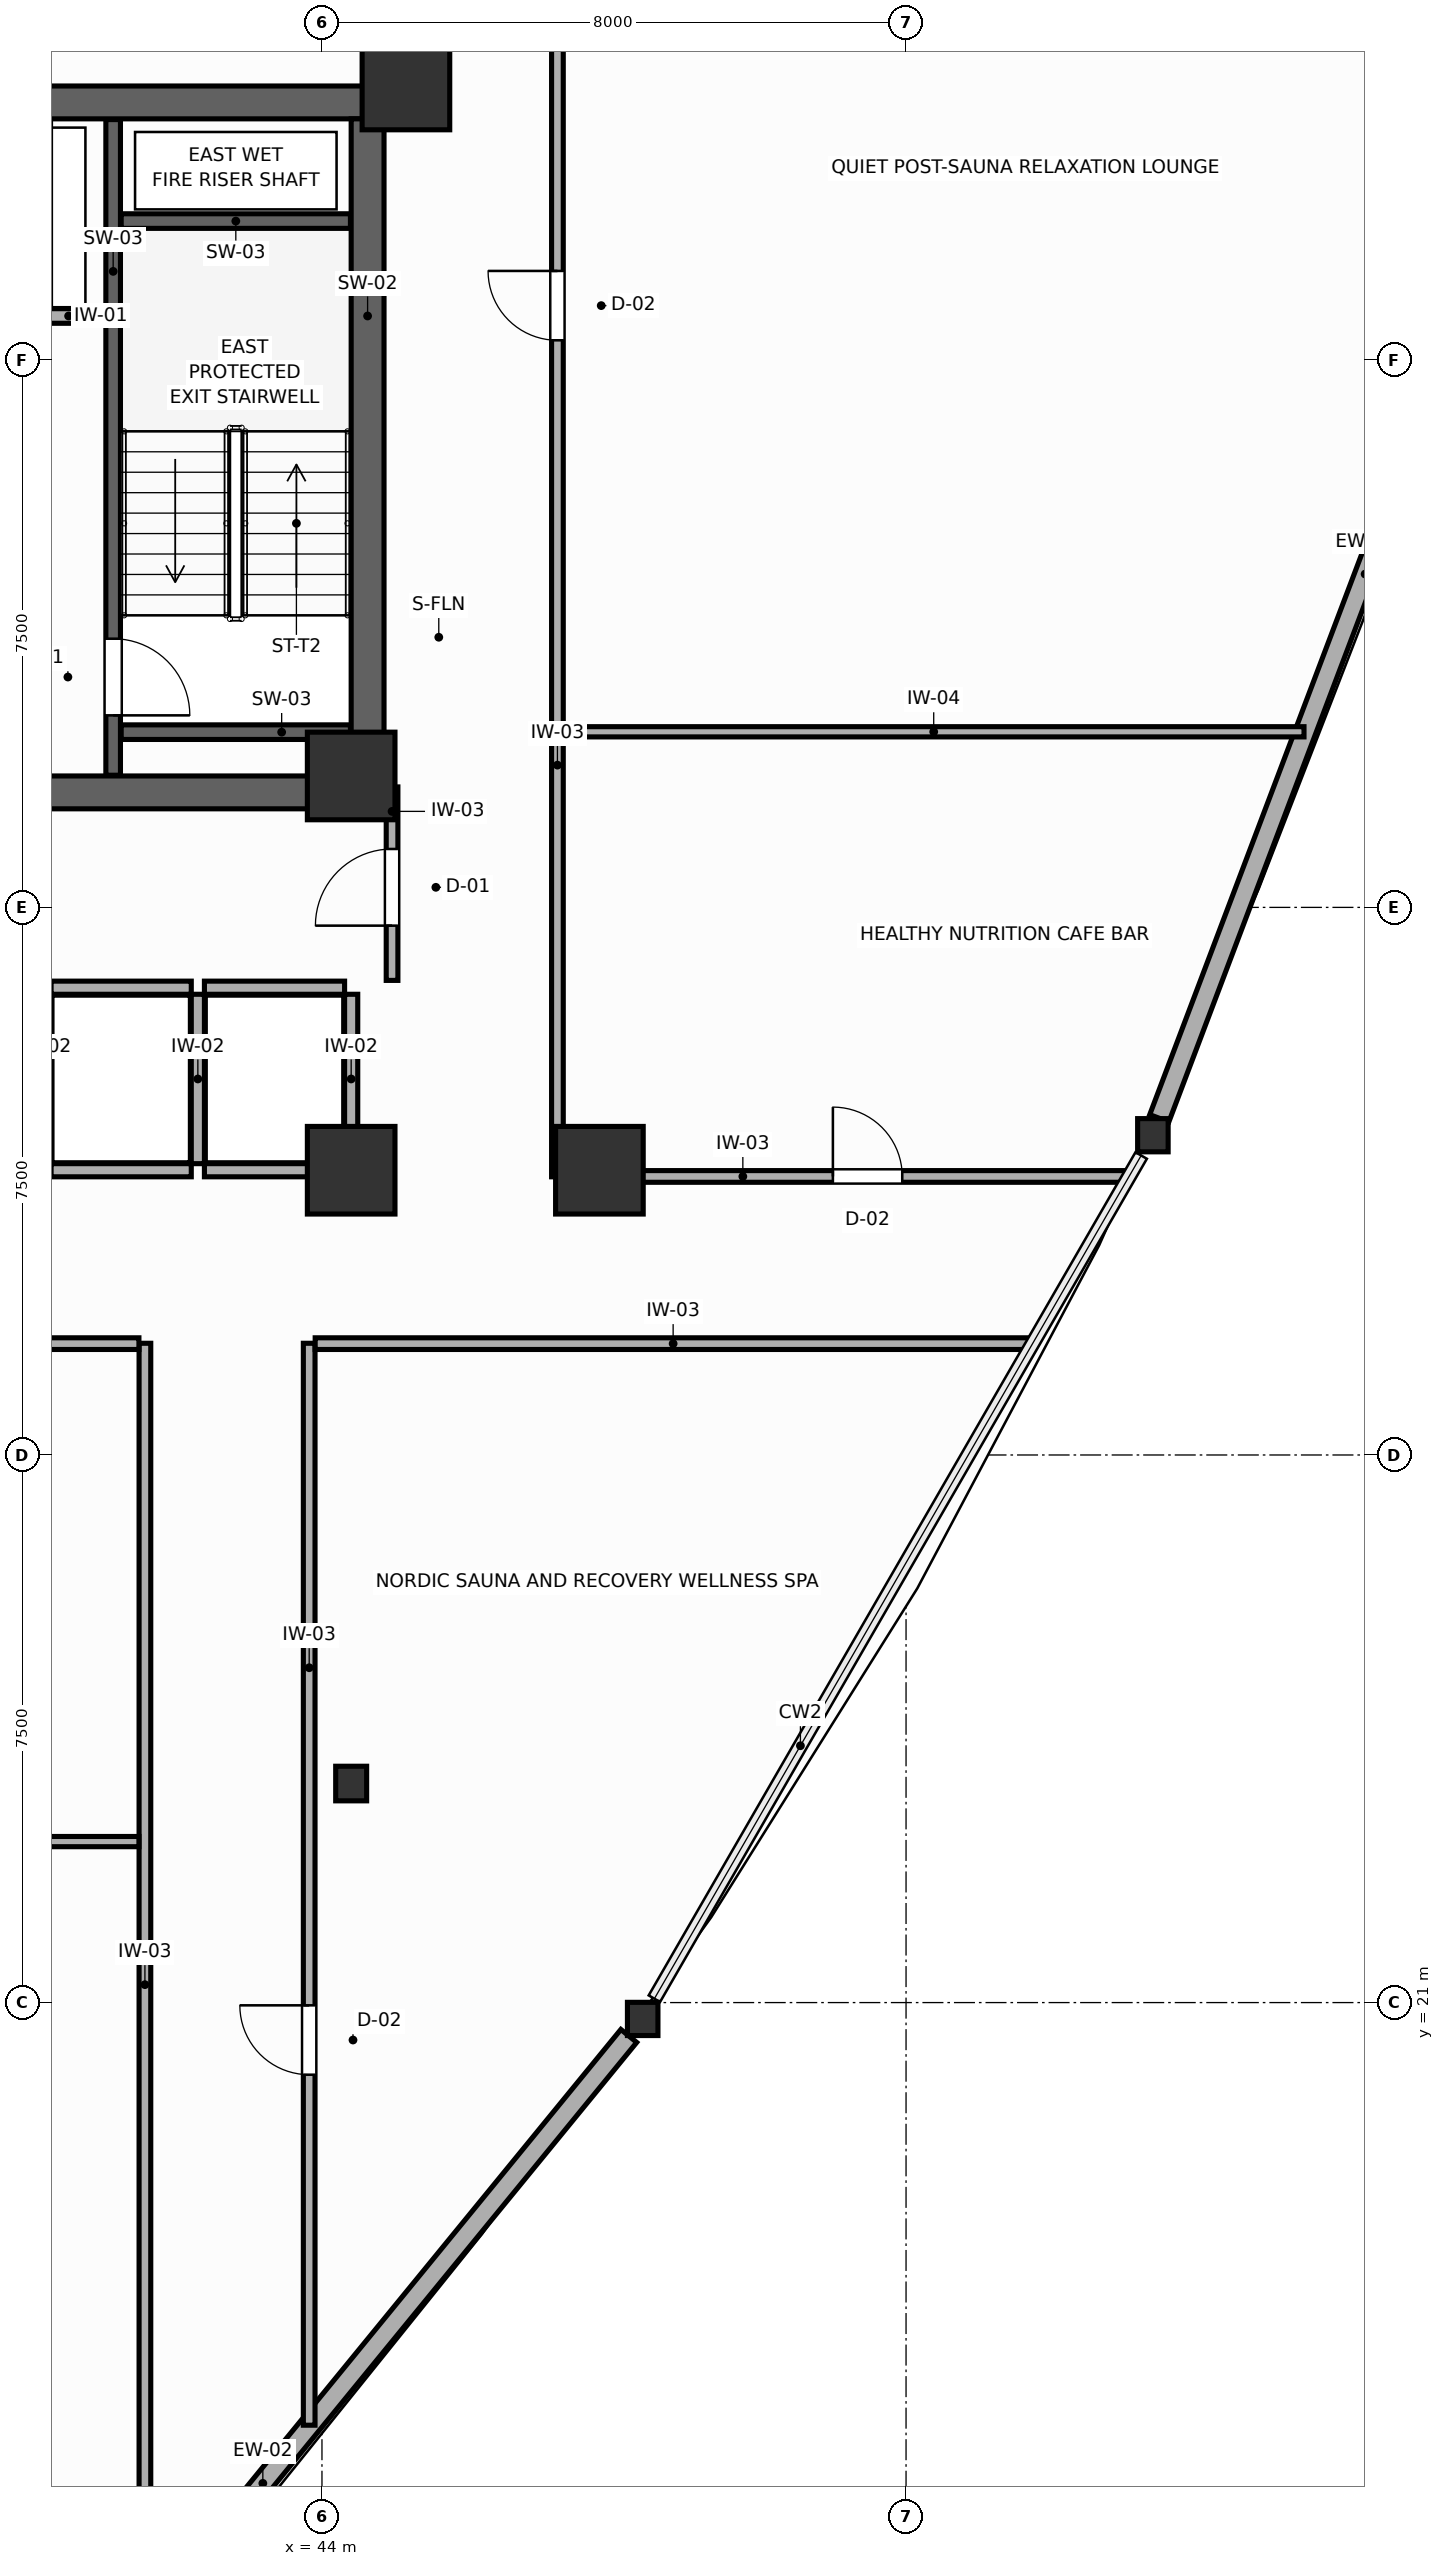
"""IFC4 building model, lengths in metres.
Left out: names, types, materials, properties, quantities, classifications, styles, units other than length and angle.
Written with IfcOpenShell. Run it as: python <this file> out.ifc"""

import sys

from ifc_helpers import new_model, si_unit, direction, frame, frame_2d, origin, origin_2d, place, context, subcontext, project, spatial, rectangle, i_section, extrude, source, transform, mapped, element, fill, save


model = new_model("IFC4")
c1 = context("Model", 3, precision=1e-05, world=origin(), true_north=direction((0.0, 1.0)))
c2 = subcontext(c1, "Body", "Model", "MODEL_VIEW")
j1 = project(units=[si_unit("LENGTHUNIT", "METRE"), si_unit("PLANEANGLEUNIT", "RADIAN")], contexts=[c1])
p1 = place(None, origin())
s1 = spatial("IfcSite", under=j1, at=p1, CompositionType="ELEMENT")
p2 = place(p1, origin())
s2 = spatial("IfcBuilding", under=s1, at=p2, CompositionType="ELEMENT")
p3 = place(p2, frame((0.0, 0.0, 109.8)))
s3 = spatial("IfcBuildingStorey", under=s2, at=p3, CompositionType="ELEMENT", Elevation=109.8)
p4 = place(p3, frame((27.15, 47.025, 0.0), z_axis=(0.0, 0.0, 1.0), x_axis=(1.0, 0.0, 0.0)))
e1 = element("IfcWall", 1, at=p4, inside=s3, PredefinedType="SHEAR", context=c2, shape_type="SweptSolid", body=[
    extrude(rectangle(XDim=17.7, YDim=0.45, at=frame_2d((8.85, 0.0))), origin(), (0.0, 0.0, 1.0), 3.6),
])
p5 = place(p3, frame((27.15, 37.575, 0.0), z_axis=(0.0, 0.0, 1.0), x_axis=(1.0, 0.0, 0.0)))
e2 = element("IfcWall", 2, at=p5, inside=s3, PredefinedType="SHEAR", context=c2, shape_type="SweptSolid", body=[
    extrude(rectangle(XDim=17.7, YDim=0.45, at=frame_2d((8.85, 0.0))), origin(), (0.0, 0.0, 1.0), 3.6),
])
p6 = place(p5, frame((4.875, 0.0, 0.0)))
e3 = element("IfcOpeningElement", 3, at=p6, cuts=e2, PredefinedType="OPENING", context=c2, shape_type="SweptSolid", body=[
    extrude(rectangle(XDim=1.05, YDim=2.1, at=frame_2d((0.525, 1.05))), frame((0.0, 0.235, 0.0), z_axis=(0.0, -1.0, 0.0), x_axis=(1.0, 0.0, 0.0)), (0.0, 0.0, 1.0), 0.47),
])
p7 = place(p5, frame((11.775, 0.0, 0.0)))
e4 = element("IfcOpeningElement", 4, at=p7, cuts=e2, PredefinedType="OPENING", context=c2, shape_type="SweptSolid", body=[
    extrude(rectangle(XDim=1.05, YDim=2.1, at=frame_2d((0.525, 1.05))), frame((0.0, 0.235, 0.0), z_axis=(0.0, -1.0, 0.0), x_axis=(1.0, 0.0, 0.0)), (0.0, 0.0, 1.0), 0.47),
])
p8 = place(p3, frame((44.625, 37.8, 0.0), z_axis=(0.0, 0.0, 1.0), x_axis=(0.0, 1.0, 0.0)))
e5 = element("IfcWall", 5, at=p8, inside=s3, PredefinedType="SHEAR", context=c2, shape_type="SweptSolid", body=[
    extrude(rectangle(XDim=9.0, YDim=0.45, at=frame_2d((4.5, 0.0))), origin(), (0.0, 0.0, 1.0), 3.6),
])
m1 = source(origin(), c2, "Body", "SweptSolid", [
    extrude(rectangle(XDim=1.2, YDim=1.2, at=origin_2d()), origin(), (0.0, 0.0, 1.0), 3.6),
])
for number, where, z_axis, x_axis in (
    (6, (45.15, 47.25, 0.0), (0.0, 0.0, 1.0), (1.0, 0.0, 0.0)),
    (7, (44.4, 37.8, 0.0), (0.0, 0.0, 1.0), (1.0, 0.0, 0.0)),
    (8, (44.4, 32.4, 0.0), (0.0, 0.0, 1.0), (1.0, 0.0, 0.0)),
    (9, (47.8, 32.4, 0.0), (0.0, 0.0, 1.0), (1.0, 0.0, 0.0)),
):
    element("IfcColumn", number, at=place(p3, frame(where, z_axis=z_axis, x_axis=x_axis)), inside=s3, PredefinedType="COLUMN", context=c2, shape_type="MappedRepresentation", body=[
        mapped(m1, transform((0.0, 0.0, 0.0), scale=1.0)),
    ])
m2 = source(origin(), c2, "Body", "SweptSolid", [
    extrude(i_section(OverallWidth=0.424, OverallDepth=0.474, WebThickness=0.045, FlangeThickness=0.072, FilletRadius=0.015, at=origin_2d()), origin(), (0.0, 0.0, 1.0), 3.6),
])
p9 = place(p3, frame((44.4, 24.0, 0.0), z_axis=(0.0, 0.0, 1.0), x_axis=(1.0, 0.0, 0.0)))
e10 = element("IfcColumn", 10, at=p9, inside=s3, PredefinedType="COLUMN", context=c2, shape_type="MappedRepresentation", body=[
    mapped(m2, transform((0.0, 0.0, 0.0), scale=1.0)),
])
m3 = source(origin(), c2, "Body", "SweptSolid", [
    extrude(i_section(OverallWidth=0.418, OverallDepth=0.455, WebThickness=0.039, FlangeThickness=0.063, FilletRadius=0.015, at=origin_2d()), origin(), (0.0, 0.0, 1.0), 3.6),
])
for number, where, z_axis, x_axis in (
    (11, (48.393, 20.776, 0.0), (0.0, 0.0, 1.0), (1.0, 0.0, 0.0)),
    (12, (55.381, 32.879, 0.0), (0.0, 0.0, 1.0), (1.0, 0.0, 0.0)),
):
    element("IfcColumn", number, at=place(p3, frame(where, z_axis=z_axis, x_axis=x_axis)), inside=s3, PredefinedType="COLUMN", context=c2, shape_type="MappedRepresentation", body=[
        mapped(m3, transform((0.0, 0.0, 0.0), scale=1.0)),
    ])
p10 = place(p3, frame((38.177, 8.287, 0.0), z_axis=(0.0, 0.0, 1.0), x_axis=(0.633140387555, 0.774036982092, 0.0)))
e13 = element("IfcWall", 13, at=p10, inside=s3, PredefinedType="SOLIDWALL", context=c2, shape_type="SweptSolid", body=[
    extrude(rectangle(XDim=15.834, YDim=0.28, at=frame_2d((7.917, 0.0))), origin(), (0.0, 0.0, 1.0), 1.87),
])
p11 = place(p3, frame((55.469, 33.112, 0.0), z_axis=(0.0, 0.0, 1.0), x_axis=(0.353771130195, 0.935332019895, 0.0)))
e14 = element("IfcWall", 14, at=p11, inside=s3, PredefinedType="SOLIDWALL", context=c2, shape_type="SweptSolid", body=[
    extrude(rectangle(XDim=15.937, YDim=0.28, at=frame_2d((7.969, 0.0))), origin(), (0.0, 0.0, 1.0), 1.87),
])
p12 = place(p3, frame((41.14, 37.81, 0.0), z_axis=(0.0, 0.0, 1.0), x_axis=(0.0, 1.0, 0.0)))
e15 = element("IfcWall", 15, at=p12, inside=s3, PredefinedType="SHEAR", context=c2, shape_type="SweptSolid", body=[
    extrude(rectangle(XDim=8.98, YDim=0.2, at=frame_2d((4.49, 0.0))), origin(), (0.0, 0.0, 1.0), 3.6),
])
p13 = place(p12, frame((0.82, 0.0, 0.0)))
e16 = element("IfcOpeningElement", 16, at=p13, cuts=e15, PredefinedType="OPENING", context=c2, shape_type="SweptSolid", body=[
    extrude(rectangle(XDim=1.05, YDim=2.1, at=frame_2d((0.525, 1.05))), frame((0.0, 0.11, 0.0), z_axis=(0.0, -1.0, 0.0), x_axis=(1.0, 0.0, 0.0)), (0.0, 0.0, 1.0), 0.22),
])
for number, where, z_axis, x_axis in (
    (17, (41.25, 45.4, 0.0), (0.0, 0.0, 1.0), (1.0, 0.0, 0.0)),
    (18, (41.25, 38.4, 0.0), (0.0, 0.0, 1.0), (1.0, 0.0, 0.0)),
):
    element("IfcWall", number, at=place(p3, frame(where, z_axis=z_axis, x_axis=x_axis)), inside=s3, PredefinedType="SHEAR", context=c2, shape_type="SweptSolid", body=[
        extrude(rectangle(XDim=3.14, YDim=0.2, at=frame_2d((1.57, 0.0))), origin(), (0.0, 0.0, 1.0), 3.6),
    ])
p14 = place(p3, frame((37.65, 44.1, 0.0), z_axis=(0.0, 0.0, 1.0), x_axis=(1.0, 0.0, 0.0)))
e19 = element("IfcWall", 19, at=p14, inside=s3, PredefinedType="PARTITIONING", context=c2, shape_type="SweptSolid", body=[
    extrude(rectangle(XDim=3.38, YDim=0.2, at=frame_2d((1.69, 0.0))), origin(), (0.0, 0.0, 1.0), 3.4),
])
p15 = place(p14, frame((1.0, 0.0, 0.0)))
e20 = element("IfcOpeningElement", 20, at=p15, cuts=e19, PredefinedType="OPENING", context=c2, shape_type="SweptSolid", body=[
    extrude(rectangle(XDim=1.2, YDim=2.1, at=frame_2d((0.6, 1.05))), frame((0.0, 0.11, 0.0), z_axis=(0.0, -1.0, 0.0), x_axis=(1.0, 0.0, 0.0)), (0.0, 0.0, 1.0), 0.22),
])
p16 = place(p3, frame((40.29, 34.9, 0.0), z_axis=(0.0, 0.0, 1.0), x_axis=(1.0, 0.0, 0.0)))
e21 = element("IfcWall", 21, at=p16, inside=s3, PredefinedType="PARTITIONING", context=c2, shape_type="SweptSolid", body=[
    extrude(rectangle(XDim=1.92, YDim=0.18, at=frame_2d((0.96, 0.0))), origin(), (0.0, 0.0, 1.0), 3.4),
])
p17 = place(p3, frame((40.29, 32.4, 0.0), z_axis=(0.0, 0.0, 1.0), x_axis=(1.0, 0.0, 0.0)))
e22 = element("IfcWall", 22, at=p17, inside=s3, PredefinedType="PARTITIONING", context=c2, shape_type="SweptSolid", body=[
    extrude(rectangle(XDim=1.92, YDim=0.18, at=frame_2d((0.96, 0.0))), origin(), (0.0, 0.0, 1.0), 2.16),
])
p18 = place(p3, frame((42.39, 34.9, 0.0), z_axis=(0.0, 0.0, 1.0), x_axis=(1.0, 0.0, 0.0)))
e23 = element("IfcWall", 23, at=p18, inside=s3, PredefinedType="PARTITIONING", context=c2, shape_type="SweptSolid", body=[
    extrude(rectangle(XDim=1.92, YDim=0.18, at=frame_2d((0.96, 0.0))), origin(), (0.0, 0.0, 1.0), 3.4),
])
p19 = place(p3, frame((42.39, 32.4, 0.0), z_axis=(0.0, 0.0, 1.0), x_axis=(1.0, 0.0, 0.0)))
e24 = element("IfcWall", 24, at=p19, inside=s3, PredefinedType="PARTITIONING", context=c2, shape_type="SweptSolid", body=[
    extrude(rectangle(XDim=1.92, YDim=0.18, at=frame_2d((0.96, 0.0))), origin(), (0.0, 0.0, 1.0), 2.16),
])
for number, where, z_axis, x_axis in (
    (25, (42.3, 32.49, 0.0), (0.0, 0.0, 1.0), (0.0, 1.0, 0.0)),
    (26, (44.4, 32.49, 0.0), (0.0, 0.0, 1.0), (0.0, 1.0, 0.0)),
):
    element("IfcWall", number, at=place(p3, frame(where, z_axis=z_axis, x_axis=x_axis)), inside=s3, PredefinedType="PARTITIONING", context=c2, shape_type="SweptSolid", body=[
        extrude(rectangle(XDim=2.32, YDim=0.18, at=frame_2d((1.16, 0.0))), origin(), (0.0, 0.0, 1.0), 3.4),
    ])
p20 = place(p3, frame((44.96, 35.0, 0.0), z_axis=(0.0, 0.0, 1.0), x_axis=(0.0, 1.0, 0.0)))
e27 = element("IfcWall", 27, at=p20, inside=s3, PredefinedType="PARTITIONING", context=c2, shape_type="SweptSolid", body=[
    extrude(rectangle(XDim=2.65, YDim=0.16, at=frame_2d((1.325, 0.0))), origin(), (0.0, 0.0, 1.0), 3.4),
])
p21 = place(p20, frame((0.75, 0.0, 0.0)))
e28 = element("IfcOpeningElement", 28, at=p21, cuts=e27, PredefinedType="OPENING", context=c2, shape_type="SweptSolid", body=[
    extrude(rectangle(XDim=1.05, YDim=2.1, at=frame_2d((0.525, 1.05))), frame((0.0, 0.09, 0.0), z_axis=(0.0, -1.0, 0.0), x_axis=(1.0, 0.0, 0.0)), (0.0, 0.0, 1.0), 0.18),
])
p22 = place(p3, frame((47.225, 32.31, 0.0), z_axis=(0.0, 0.0, 1.0), x_axis=(0.0, 1.0, 0.0)))
e29 = element("IfcWall", 29, at=p22, inside=s3, PredefinedType="PARTITIONING", context=c2, shape_type="SweptSolid", body=[
    extrude(rectangle(XDim=21.322, YDim=0.16, at=frame_2d((10.661, 0.0))), origin(), (0.0, 0.0, 1.0), 3.4),
])
p23 = place(p22, frame((11.457, 0.0, 0.0)))
e30 = element("IfcOpeningElement", 30, at=p23, cuts=e29, PredefinedType="OPENING", context=c2, shape_type="SweptSolid", body=[
    extrude(rectangle(XDim=0.95, YDim=2.05, at=frame_2d((0.475, 1.025))), frame((0.0, 0.09, 0.0), z_axis=(0.0, -1.0, 0.0), x_axis=(1.0, 0.0, 0.0)), (0.0, 0.0, 1.0), 0.18),
])
p24 = place(p3, frame((41.575, 12.461, 0.0), z_axis=(0.0, 0.0, 1.0), x_axis=(0.0, 1.0, 0.0)))
e31 = element("IfcWall", 31, at=p24, inside=s3, PredefinedType="PARTITIONING", context=c2, shape_type="SweptSolid", body=[
    extrude(rectangle(XDim=17.569, YDim=0.16, at=frame_2d((8.785, 0.0))), origin(), (0.0, 0.0, 1.0), 3.4),
])
p25 = place(p3, frame((43.825, 15.212, 0.0), z_axis=(0.0, 0.0, 1.0), x_axis=(0.0, 1.0, 0.0)))
e32 = element("IfcWall", 32, at=p25, inside=s3, PredefinedType="PARTITIONING", context=c2, shape_type="SweptSolid", body=[
    extrude(rectangle(XDim=14.818, YDim=0.16, at=frame_2d((7.409, 0.0))), origin(), (0.0, 0.0, 1.0), 3.4),
])
p26 = place(p25, frame((4.801, 0.0, 0.0)))
e33 = element("IfcOpeningElement", 33, at=p26, cuts=e32, PredefinedType="OPENING", context=c2, shape_type="SweptSolid", body=[
    extrude(rectangle(XDim=0.95, YDim=2.05, at=frame_2d((0.475, 1.025))), frame((0.0, 0.09, 0.0), z_axis=(0.0, -1.0, 0.0), x_axis=(1.0, 0.0, 0.0)), (0.0, 0.0, 1.0), 0.18),
])
p27 = place(p3, frame((30.507, 30.025, 0.0), z_axis=(0.0, 0.0, 1.0), x_axis=(1.0, 0.0, 0.0)))
e34 = element("IfcWall", 34, at=p27, inside=s3, PredefinedType="PARTITIONING", context=c2, shape_type="SweptSolid", body=[
    extrude(rectangle(XDim=10.986, YDim=0.16, at=frame_2d((5.493, 0.0))), origin(), (0.0, 0.0, 1.0), 3.4),
])
p28 = place(p27, frame((1.512, 0.0, 0.0)))
e35 = element("IfcOpeningElement", 35, at=p28, cuts=e34, PredefinedType="OPENING", context=c2, shape_type="SweptSolid", body=[
    extrude(rectangle(XDim=0.95, YDim=2.05, at=frame_2d((0.475, 1.025))), frame((0.0, 0.09, 0.0), z_axis=(0.0, -1.0, 0.0), x_axis=(1.0, 0.0, 0.0)), (0.0, 0.0, 1.0), 0.18),
])
p29 = place(p3, frame((43.907, 30.025, 0.0), z_axis=(0.0, 0.0, 1.0), x_axis=(1.0, 0.0, 0.0)))
e36 = element("IfcWall", 36, at=p29, inside=s3, PredefinedType="PARTITIONING", context=c2, shape_type="SweptSolid", body=[
    extrude(rectangle(XDim=9.806, YDim=0.16, at=frame_2d((4.903, 0.0))), origin(), (0.0, 0.0, 1.0), 3.4),
])
p30 = place(p3, frame((47.307, 32.315, 0.0), z_axis=(0.0, 0.0, 1.0), x_axis=(1.0, 0.0, 0.0)))
e37 = element("IfcWall", 37, at=p30, inside=s3, PredefinedType="PARTITIONING", context=c2, shape_type="SweptSolid", body=[
    extrude(rectangle(XDim=7.728, YDim=0.16, at=frame_2d((3.864, 0.0))), origin(), (0.0, 0.0, 1.0), 2.16),
])
p31 = place(p30, frame((3.691, 0.0, 0.0)))
e38 = element("IfcOpeningElement", 38, at=p31, cuts=e37, PredefinedType="OPENING", context=c2, shape_type="SweptSolid", body=[
    extrude(rectangle(XDim=0.95, YDim=2.05, at=frame_2d((0.475, 1.025))), frame((0.0, 0.09, 0.0), z_axis=(0.0, -1.0, 0.0), x_axis=(1.0, 0.0, 0.0)), (0.0, 0.0, 1.0), 0.18),
])
p32 = place(p3, frame((44.965, 47.34, 0.0), z_axis=(0.0, 0.0, 1.0), x_axis=(0.0, 1.0, 0.0)))
e39 = element("IfcWall", 39, at=p32, inside=s3, PredefinedType="PARTITIONING", context=c2, shape_type="SweptSolid", body=[
    extrude(rectangle(XDim=6.661, YDim=0.16, at=frame_2d((3.331, 0.0))), origin(), (0.0, 0.0, 1.0), 2.16),
])
p33 = place(p3, frame((30.507, 23.205, 0.0), z_axis=(0.0, 0.0, 1.0), x_axis=(1.0, 0.0, 0.0)))
e40 = element("IfcWall", 40, at=p33, inside=s3, PredefinedType="PARTITIONING", context=c2, shape_type="SweptSolid", body=[
    extrude(rectangle(XDim=10.986, YDim=0.14, at=frame_2d((5.493, 0.0))), origin(), (0.0, 0.0, 1.0), 3.4),
])
p34 = place(p33, frame((1.601, 0.0, 0.0)))
e41 = element("IfcOpeningElement", 41, at=p34, cuts=e40, PredefinedType="OPENING", context=c2, shape_type="SweptSolid", body=[
    extrude(rectangle(XDim=0.95, YDim=2.05, at=frame_2d((0.475, 1.025))), frame((0.0, 0.08, 0.0), z_axis=(0.0, -1.0, 0.0), x_axis=(1.0, 0.0, 0.0)), (0.0, 0.0, 1.0), 0.16),
])
p35 = place(p3, frame((47.307, 38.405, 0.0), z_axis=(0.0, 0.0, 1.0), x_axis=(1.0, 0.0, 0.0)))
e42 = element("IfcWall", 42, at=p35, inside=s3, PredefinedType="PARTITIONING", context=c2, shape_type="SweptSolid", body=[
    extrude(rectangle(XDim=10.144, YDim=0.14, at=frame_2d((5.072, 0.0))), origin(), (0.0, 0.0, 1.0), 3.4),
])
p36 = place(p13, frame((1.05, 0.0, 0.0), z_axis=(0.0, 0.0, 1.0), x_axis=(-1.0, 0.0, 0.0)))
e43 = element("IfcDoor", 43, at=p36, inside=s3, OperationType="SINGLE_SWING_RIGHT", PredefinedType="DOOR", context=c2, shape_type="SweptSolid", body=[
    extrude(rectangle(XDim=1.05, YDim=2.1, at=frame_2d((0.525, 1.05))), frame((0.0, 0.025, 0.0), z_axis=(0.0, -1.0, 0.0), x_axis=(1.0, 0.0, 0.0)), (0.0, 0.0, 1.0), 0.05),
])
fill(e16, e43)
p37 = place(p21, origin())
e44 = element("IfcDoor", 44, at=p37, inside=s3, OperationType="SINGLE_SWING_LEFT", PredefinedType="DOOR", context=c2, shape_type="SweptSolid", body=[
    extrude(rectangle(XDim=1.05, YDim=2.1, at=frame_2d((0.525, 1.05))), frame((0.0, 0.025, 0.0), z_axis=(0.0, -1.0, 0.0), x_axis=(1.0, 0.0, 0.0)), (0.0, 0.0, 1.0), 0.05),
])
fill(e28, e44)
p38 = place(p23, origin())
e45 = element("IfcDoor", 45, at=p38, inside=s3, OperationType="SINGLE_SWING_RIGHT", PredefinedType="DOOR", context=c2, shape_type="SweptSolid", body=[
    extrude(rectangle(XDim=0.95, YDim=2.05, at=frame_2d((0.475, 1.025))), frame((0.0, 0.025, 0.0), z_axis=(0.0, -1.0, 0.0), x_axis=(1.0, 0.0, 0.0)), (0.0, 0.0, 1.0), 0.05),
])
fill(e30, e45)
p39 = place(p26, origin())
e46 = element("IfcDoor", 46, at=p39, inside=s3, OperationType="SINGLE_SWING_RIGHT", PredefinedType="DOOR", context=c2, shape_type="SweptSolid", body=[
    extrude(rectangle(XDim=0.95, YDim=2.05, at=frame_2d((0.475, 1.025))), frame((0.0, 0.025, 0.0), z_axis=(0.0, -1.0, 0.0), x_axis=(1.0, 0.0, 0.0)), (0.0, 0.0, 1.0), 0.05),
])
fill(e33, e46)
p40 = place(p31, origin())
e47 = element("IfcDoor", 47, at=p40, inside=s3, OperationType="SINGLE_SWING_LEFT", PredefinedType="DOOR", context=c2, shape_type="SweptSolid", body=[
    extrude(rectangle(XDim=0.95, YDim=2.05, at=frame_2d((0.475, 1.025))), frame((0.0, 0.025, 0.0), z_axis=(0.0, -1.0, 0.0), x_axis=(1.0, 0.0, 0.0)), (0.0, 0.0, 1.0), 0.05),
])
fill(e38, e47)
save(model, sys.argv[1])
